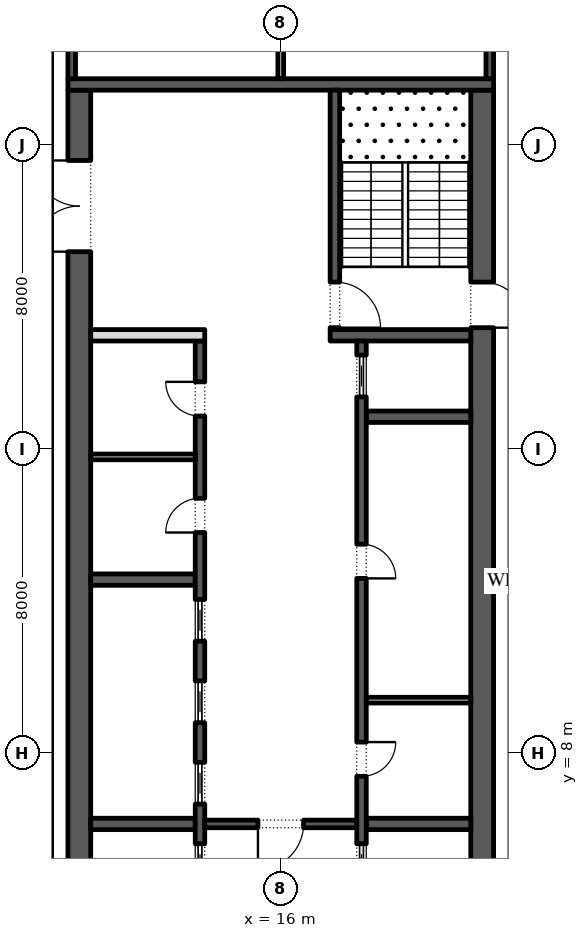
"""IFC4 building model, lengths in metres.
Left out: names, types, materials, properties, quantities, classifications, styles, units other than length and angle.
Written with IfcOpenShell. Run it as: python <this file> out.ifc"""

import sys

from ifc_helpers import new_model, si_unit, direction, frame, frame_2d, origin, place, context, subcontext, project, spatial, rectangle, extrude, element, fill, save


model = new_model("IFC4")
c1 = context("Model", 3, precision=1e-05, world=origin(), true_north=direction((0.0, 1.0)))
c2 = subcontext(c1, "Body", "Model", "MODEL_VIEW")
j1 = project(units=[si_unit("LENGTHUNIT", "METRE"), si_unit("PLANEANGLEUNIT", "RADIAN")], contexts=[c1])
p1 = place(None, origin())
s1 = spatial("IfcSite", under=j1, at=p1, CompositionType="ELEMENT")
p2 = place(p1, origin())
s2 = spatial("IfcBuilding", under=s1, at=p2, CompositionType="ELEMENT")
p3 = place(p2, frame((0.0, 0.0, 255.6)))
s3 = spatial("IfcBuildingStorey", under=s2, at=p3, CompositionType="ELEMENT", Elevation=255.6)
p4 = place(p3, frame((21.359, -11.678, 0.0), z_axis=(0.0, 0.0, 1.0), x_axis=(0.224949198343, 0.974370493275, 0.0)))
e1 = element("IfcWall", 1, at=p4, inside=s3, PredefinedType="STANDARD", context=c2, shape_type="SweptSolid", body=[
    extrude(rectangle(XDim=49.5, YDim=0.3, at=frame_2d((24.75, 0.0))), origin(), (0.0, 0.0, 1.0), 4.0),
])
p5 = place(p4, frame((1.157, 0.0, 0.45)))
e2 = element("IfcOpeningElement", 2, at=p5, cuts=e1, PredefinedType="OPENING", context=c2, shape_type="SweptSolid", body=[
    extrude(rectangle(XDim=4.5, YDim=3.05, at=frame_2d((2.25, 1.525))), frame((0.0, 0.16, 0.0), z_axis=(0.0, -1.0, 0.0), x_axis=(1.0, 0.0, 0.0)), (0.0, 0.0, 1.0), 0.32),
])
p6 = place(p4, frame((8.121, 0.0, 0.45)))
e3 = element("IfcOpeningElement", 3, at=p6, cuts=e1, PredefinedType="OPENING", context=c2, shape_type="SweptSolid", body=[
    extrude(rectangle(XDim=4.5, YDim=3.05, at=frame_2d((2.25, 1.525))), frame((0.0, 0.16, 0.0), z_axis=(0.0, -1.0, 0.0), x_axis=(1.0, 0.0, 0.0)), (0.0, 0.0, 1.0), 0.32),
])
p7 = place(p4, frame((15.236, 0.0, 0.45)))
e4 = element("IfcOpeningElement", 4, at=p7, cuts=e1, PredefinedType="OPENING", context=c2, shape_type="SweptSolid", body=[
    extrude(rectangle(XDim=4.5, YDim=3.05, at=frame_2d((2.25, 1.525))), frame((0.0, 0.16, 0.0), z_axis=(0.0, -1.0, 0.0), x_axis=(1.0, 0.0, 0.0)), (0.0, 0.0, 1.0), 0.32),
])
p8 = place(p4, frame((22.35, 0.0, 0.45)))
e5 = element("IfcOpeningElement", 5, at=p8, cuts=e1, PredefinedType="OPENING", context=c2, shape_type="SweptSolid", body=[
    extrude(rectangle(XDim=4.5, YDim=3.05, at=frame_2d((2.25, 1.525))), frame((0.0, 0.16, 0.0), z_axis=(0.0, -1.0, 0.0), x_axis=(1.0, 0.0, 0.0)), (0.0, 0.0, 1.0), 0.32),
])
p9 = place(p4, frame((29.464, 0.0, 0.45)))
e6 = element("IfcOpeningElement", 6, at=p9, cuts=e1, PredefinedType="OPENING", context=c2, shape_type="SweptSolid", body=[
    extrude(rectangle(XDim=4.5, YDim=2.95, at=frame_2d((2.25, 1.475))), frame((0.0, 0.16, 0.0), z_axis=(0.0, -1.0, 0.0), x_axis=(1.0, 0.0, 0.0)), (0.0, 0.0, 1.0), 0.32),
])
p10 = place(p4, frame((37.628, 0.0, 0.0)))
e7 = element("IfcOpeningElement", 7, at=p10, cuts=e1, PredefinedType="OPENING", context=c2, shape_type="SweptSolid", body=[
    extrude(rectangle(XDim=2.4, YDim=3.325, at=frame_2d((1.2, 1.663))), frame((0.0, 0.16, 0.0), z_axis=(0.0, -1.0, 0.0), x_axis=(1.0, 0.0, 0.0)), (0.0, 0.0, 1.0), 0.32),
])
p11 = place(p4, frame((43.693, 0.0, 0.45)))
e8 = element("IfcOpeningElement", 8, at=p11, cuts=e1, PredefinedType="OPENING", context=c2, shape_type="SweptSolid", body=[
    extrude(rectangle(XDim=4.5, YDim=3.05, at=frame_2d((2.25, 1.525))), frame((0.0, 0.16, 0.0), z_axis=(0.0, -1.0, 0.0), x_axis=(1.0, 0.0, 0.0)), (0.0, 0.0, 1.0), 0.32),
])
p12 = place(p3, frame((21.3, -2.45, 0.0), z_axis=(0.0, 0.0, 1.0), x_axis=(0.0, 1.0, 0.0)))
e9 = element("IfcWall", 9, at=p12, inside=s3, PredefinedType="SHEAR", context=c2, shape_type="SweptSolid", body=[
    extrude(rectangle(XDim=27.9, YDim=0.6, at=frame_2d((13.95, 0.0))), origin(), (0.0, 0.0, 1.0), 4.0),
])
p13 = place(p12, frame((5.05, 0.0, 0.0)))
e10 = element("IfcOpeningElement", 10, at=p13, cuts=e9, PredefinedType="OPENING", context=c2, shape_type="SweptSolid", body=[
    extrude(rectangle(XDim=1.2, YDim=2.1, at=frame_2d((0.6, 1.05))), frame((0.0, 0.31, 0.0), z_axis=(0.0, -1.0, 0.0), x_axis=(1.0, 0.0, 0.0)), (0.0, 0.0, 1.0), 0.62),
])
p14 = place(p12, frame((21.65, 0.0, 0.0)))
e11 = element("IfcOpeningElement", 11, at=p14, cuts=e9, PredefinedType="OPENING", context=c2, shape_type="SweptSolid", body=[
    extrude(rectangle(XDim=1.2, YDim=2.1, at=frame_2d((0.6, 1.05))), frame((0.0, 0.31, 0.0), z_axis=(0.0, -1.0, 0.0), x_axis=(1.0, 0.0, 0.0)), (0.0, 0.0, 1.0), 0.62),
])
p15 = place(p3, frame((10.7, -2.45, 0.0), z_axis=(0.0, 0.0, 1.0), x_axis=(0.0, 1.0, 0.0)))
e12 = element("IfcWall", 12, at=p15, inside=s3, PredefinedType="SHEAR", context=c2, shape_type="SweptSolid", body=[
    extrude(rectangle(XDim=27.9, YDim=0.6, at=frame_2d((13.95, 0.0))), origin(), (0.0, 0.0, 1.0), 4.0),
])
p16 = place(p15, frame((23.65, 0.0, 0.0)))
e13 = element("IfcOpeningElement", 13, at=p16, cuts=e12, PredefinedType="OPENING", context=c2, shape_type="SweptSolid", body=[
    extrude(rectangle(XDim=2.4, YDim=2.1, at=frame_2d((1.2, 1.05))), frame((0.0, 0.31, 0.0), z_axis=(0.0, -1.0, 0.0), x_axis=(1.0, 0.0, 0.0)), (0.0, 0.0, 1.0), 0.62),
])
p17 = place(p15, frame((1.087, 0.0, 0.0)))
e14 = element("IfcOpeningElement", 14, at=p17, cuts=e12, PredefinedType="OPENING", context=c2, shape_type="SweptSolid", body=[
    extrude(rectangle(XDim=0.9, YDim=2.1, at=frame_2d((0.45, 1.05))), frame((0.0, 0.31, 0.0), z_axis=(0.0, -1.0, 0.0), x_axis=(1.0, 0.0, 0.0)), (0.0, 0.0, 1.0), 0.62),
])
p18 = place(p15, frame((4.262, 0.0, 0.0)))
e15 = element("IfcOpeningElement", 15, at=p18, cuts=e12, PredefinedType="OPENING", context=c2, shape_type="SweptSolid", body=[
    extrude(rectangle(XDim=1.0, YDim=2.1, at=frame_2d((0.5, 1.05))), frame((0.0, 0.31, 0.0), z_axis=(0.0, -1.0, 0.0), x_axis=(1.0, 0.0, 0.0)), (0.0, 0.0, 1.0), 0.62),
])
p19 = place(p3, frame((10.4, 25.6, 0.0), z_axis=(0.0, 0.0, 1.0), x_axis=(1.0, 0.0, 0.0)))
e16 = element("IfcWall", 16, at=p19, inside=s3, PredefinedType="SHEAR", context=c2, shape_type="SweptSolid", body=[
    extrude(rectangle(XDim=11.2, YDim=0.3, at=frame_2d((5.6, 0.0))), origin(), (0.0, 0.0, 1.0), 4.0),
])
p20 = place(p3, frame((17.3, 19.0, 0.0), z_axis=(0.0, 0.0, 1.0), x_axis=(1.0, 0.0, 0.0)))
e17 = element("IfcWall", 17, at=p20, inside=s3, PredefinedType="SHEAR", context=c2, shape_type="SweptSolid", body=[
    extrude(rectangle(XDim=3.7, YDim=0.3, at=frame_2d((1.85, 0.0))), origin(), (0.0, 0.0, 1.0), 4.0),
])
p21 = place(p3, frame((17.425, 19.15, 0.0), z_axis=(0.0, 0.0, 1.0), x_axis=(0.0, 1.0, 0.0)))
e18 = element("IfcWall", 18, at=p21, inside=s3, PredefinedType="SHEAR", context=c2, shape_type="SweptSolid", body=[
    extrude(rectangle(XDim=6.3, YDim=0.25, at=frame_2d((3.15, 0.0))), origin(), (0.0, 0.0, 1.0), 4.0),
])
p22 = place(p21, frame((0.05, 0.0, 0.0)))
e19 = element("IfcOpeningElement", 19, at=p22, cuts=e18, PredefinedType="OPENING", context=c2, shape_type="SweptSolid", body=[
    extrude(rectangle(XDim=1.2, YDim=2.1, at=frame_2d((0.6, 1.05))), frame((0.0, 0.135, 0.0), z_axis=(0.0, -1.0, 0.0), x_axis=(1.0, 0.0, 0.0)), (0.0, 0.0, 1.0), 0.27),
])
for number, where, z_axis, x_axis in (
    (20, (18.25, 6.143, 0.0), (0.0, 0.0, 1.0), (1.0, 0.0, 0.0)),
    (21, (18.25, 16.857, 0.0), (0.0, 0.0, 1.0), (1.0, 0.0, 0.0)),
):
    element("IfcWall", number, at=place(p3, frame(where, z_axis=z_axis, x_axis=x_axis)), inside=s3, PredefinedType="SHEAR", context=c2, shape_type="SweptSolid", body=[
        extrude(rectangle(XDim=2.75, YDim=0.3, at=frame_2d((1.375, 0.0))), origin(), (0.0, 0.0, 1.0), 4.0),
    ])
p23 = place(p3, frame((18.125, 4.15, 0.0), z_axis=(0.0, 0.0, 1.0), x_axis=(0.0, 1.0, 0.0)))
e22 = element("IfcWall", 22, at=p23, inside=s3, PredefinedType="SHEAR", context=c2, shape_type="SweptSolid", body=[
    extrude(rectangle(XDim=14.7, YDim=0.25, at=frame_2d((7.35, 0.0))), origin(), (0.0, 0.0, 1.0), 4.0),
])
p24 = place(p23, frame((3.246, 0.0, 0.0)))
e23 = element("IfcOpeningElement", 23, at=p24, cuts=e22, PredefinedType="OPENING", context=c2, shape_type="SweptSolid", body=[
    extrude(rectangle(XDim=0.9, YDim=2.1, at=frame_2d((0.45, 1.05))), frame((0.0, 0.135, 0.0), z_axis=(0.0, -1.0, 0.0), x_axis=(1.0, 0.0, 0.0)), (0.0, 0.0, 1.0), 0.27),
])
p25 = place(p23, frame((8.454, 0.0, 0.0)))
e24 = element("IfcOpeningElement", 24, at=p25, cuts=e22, PredefinedType="OPENING", context=c2, shape_type="SweptSolid", body=[
    extrude(rectangle(XDim=0.9, YDim=2.1, at=frame_2d((0.45, 1.05))), frame((0.0, 0.135, 0.0), z_axis=(0.0, -1.0, 0.0), x_axis=(1.0, 0.0, 0.0)), (0.0, 0.0, 1.0), 0.27),
])
p26 = place(p23, frame((0.371, 0.0, 0.0)))
e25 = element("IfcOpeningElement", 25, at=p26, cuts=e22, PredefinedType="OPENING", context=c2, shape_type="SweptSolid", body=[
    extrude(rectangle(XDim=1.1, YDim=2.1, at=frame_2d((0.55, 1.05))), frame((0.0, 0.135, 0.0), z_axis=(0.0, -1.0, 0.0), x_axis=(1.0, 0.0, 0.0)), (0.0, 0.0, 1.0), 0.27),
])
p27 = place(p23, frame((13.229, 0.0, 0.0)))
e26 = element("IfcOpeningElement", 26, at=p27, cuts=e22, PredefinedType="OPENING", context=c2, shape_type="SweptSolid", body=[
    extrude(rectangle(XDim=1.1, YDim=2.1, at=frame_2d((0.55, 1.05))), frame((0.0, 0.135, 0.0), z_axis=(0.0, -1.0, 0.0), x_axis=(1.0, 0.0, 0.0)), (0.0, 0.0, 1.0), 0.27),
])
p28 = place(p3, frame((18.25, 9.4, 0.0), z_axis=(0.0, 0.0, 1.0), x_axis=(1.0, 0.0, 0.0)))
e27 = element("IfcWall", 27, at=p28, inside=s3, PredefinedType="PARTITIONING", context=c2, shape_type="SweptSolid", body=[
    extrude(rectangle(XDim=2.75, YDim=0.15, at=frame_2d((1.375, 0.0))), origin(), (0.0, 0.0, 1.0), 4.0),
])
for number, where, z_axis, x_axis in (
    (28, (11.0, 6.143, 0.0), (0.0, 0.0, 1.0), (1.0, 0.0, 0.0)),
    (29, (11.0, 12.571, 0.0), (0.0, 0.0, 1.0), (1.0, 0.0, 0.0)),
):
    element("IfcWall", number, at=place(p3, frame(where, z_axis=z_axis, x_axis=x_axis)), inside=s3, PredefinedType="SHEAR", context=c2, shape_type="SweptSolid", body=[
        extrude(rectangle(XDim=2.75, YDim=0.3, at=frame_2d((1.375, 0.0))), origin(), (0.0, 0.0, 1.0), 4.0),
    ])
p29 = place(p3, frame((13.875, -2.45, 0.0), z_axis=(0.0, 0.0, 1.0), x_axis=(0.0, 1.0, 0.0)))
e30 = element("IfcWall", 30, at=p29, inside=s3, PredefinedType="SHEAR", context=c2, shape_type="SweptSolid", body=[
    extrude(rectangle(XDim=21.3, YDim=0.25, at=frame_2d((10.65, 0.0))), origin(), (0.0, 0.0, 1.0), 4.0),
])
p30 = place(p29, frame((16.261, 0.0, 0.0)))
e31 = element("IfcOpeningElement", 31, at=p30, cuts=e30, PredefinedType="OPENING", context=c2, shape_type="SweptSolid", body=[
    extrude(rectangle(XDim=0.9, YDim=2.1, at=frame_2d((0.45, 1.05))), frame((0.0, 0.135, 0.0), z_axis=(0.0, -1.0, 0.0), x_axis=(1.0, 0.0, 0.0)), (0.0, 0.0, 1.0), 0.27),
])
p31 = place(p29, frame((19.325, 0.0, 0.0)))
e32 = element("IfcOpeningElement", 32, at=p31, cuts=e30, PredefinedType="OPENING", context=c2, shape_type="SweptSolid", body=[
    extrude(rectangle(XDim=0.9, YDim=2.1, at=frame_2d((0.45, 1.05))), frame((0.0, 0.135, 0.0), z_axis=(0.0, -1.0, 0.0), x_axis=(1.0, 0.0, 0.0)), (0.0, 0.0, 1.0), 0.27),
])
p32 = place(p29, frame((6.971, 0.0, 0.0)))
e33 = element("IfcOpeningElement", 33, at=p32, cuts=e30, PredefinedType="OPENING", context=c2, shape_type="SweptSolid", body=[
    extrude(rectangle(XDim=1.1, YDim=2.1, at=frame_2d((0.55, 1.05))), frame((0.0, 0.135, 0.0), z_axis=(0.0, -1.0, 0.0), x_axis=(1.0, 0.0, 0.0)), (0.0, 0.0, 1.0), 0.27),
])
p33 = place(p29, frame((9.114, 0.0, 0.0)))
e34 = element("IfcOpeningElement", 34, at=p33, cuts=e30, PredefinedType="OPENING", context=c2, shape_type="SweptSolid", body=[
    extrude(rectangle(XDim=1.1, YDim=2.1, at=frame_2d((0.55, 1.05))), frame((0.0, 0.135, 0.0), z_axis=(0.0, -1.0, 0.0), x_axis=(1.0, 0.0, 0.0)), (0.0, 0.0, 1.0), 0.27),
])
p34 = place(p29, frame((11.257, 0.0, 0.0)))
e35 = element("IfcOpeningElement", 35, at=p34, cuts=e30, PredefinedType="OPENING", context=c2, shape_type="SweptSolid", body=[
    extrude(rectangle(XDim=1.1, YDim=2.1, at=frame_2d((0.55, 1.05))), frame((0.0, 0.135, 0.0), z_axis=(0.0, -1.0, 0.0), x_axis=(1.0, 0.0, 0.0)), (0.0, 0.0, 1.0), 0.27),
])
p35 = place(p29, frame((13.4, 0.0, 0.0)))
e36 = element("IfcOpeningElement", 36, at=p35, cuts=e30, PredefinedType="OPENING", context=c2, shape_type="SweptSolid", body=[
    extrude(rectangle(XDim=1.1, YDim=2.1, at=frame_2d((0.55, 1.05))), frame((0.0, 0.135, 0.0), z_axis=(0.0, -1.0, 0.0), x_axis=(1.0, 0.0, 0.0)), (0.0, 0.0, 1.0), 0.27),
])
p36 = place(p3, frame((11.0, 19.0, 0.0), z_axis=(0.0, 0.0, 1.0), x_axis=(1.0, 0.0, 0.0)))
e37 = element("IfcWall", 37, at=p36, inside=s3, PredefinedType="PARTITIONING", context=c2, shape_type="SweptSolid", body=[
    extrude(rectangle(XDim=3.0, YDim=0.3, at=frame_2d((1.5, 0.0))), origin(), (0.0, 0.0, 1.0), 4.0),
])
p37 = place(p3, frame((11.0, 15.8, 0.0), z_axis=(0.0, 0.0, 1.0), x_axis=(1.0, 0.0, 0.0)))
e38 = element("IfcWall", 38, at=p37, inside=s3, PredefinedType="PARTITIONING", context=c2, shape_type="SweptSolid", body=[
    extrude(rectangle(XDim=2.75, YDim=0.15, at=frame_2d((1.375, 0.0))), origin(), (0.0, 0.0, 1.0), 4.0),
])
p38 = place(p3, frame((14.0, 6.143, 0.0), z_axis=(0.0, 0.0, 1.0), x_axis=(1.0, 0.0, 0.0)))
e39 = element("IfcWall", 39, at=p38, inside=s3, PredefinedType="SHEAR", context=c2, shape_type="SweptSolid", body=[
    extrude(rectangle(XDim=4.0, YDim=0.2, at=frame_2d((2.0, 0.0))), origin(), (0.0, 0.0, 1.0), 4.0),
])
p39 = place(p38, frame((1.4, 0.0, 0.0)))
e40 = element("IfcOpeningElement", 40, at=p39, cuts=e39, PredefinedType="OPENING", context=c2, shape_type="SweptSolid", body=[
    extrude(rectangle(XDim=1.2, YDim=2.1, at=frame_2d((0.6, 1.05))), frame((0.0, 0.11, 0.0), z_axis=(0.0, -1.0, 0.0), x_axis=(1.0, 0.0, 0.0)), (0.0, 0.0, 1.0), 0.22),
])
p40 = place(p3, frame((21.5, 25.75, 0.0), z_axis=(0.0, 0.0, 1.0), x_axis=(0.0, 1.0, 0.0)))
e41 = element("IfcWall", 41, at=p40, inside=s3, PredefinedType="SHEAR", context=c2, shape_type="SweptSolid", body=[
    extrude(rectangle(XDim=4.75, YDim=0.2, at=frame_2d((2.375, 0.0))), origin(), (0.0, 0.0, 1.0), 4.0),
])
p41 = place(p40, frame((1.925, 0.0, 0.0)))
e42 = element("IfcOpeningElement", 42, at=p41, cuts=e41, PredefinedType="OPENING", context=c2, shape_type="SweptSolid", body=[
    extrude(rectangle(XDim=0.9, YDim=2.1, at=frame_2d((0.45, 1.05))), frame((0.0, 0.11, 0.0), z_axis=(0.0, -1.0, 0.0), x_axis=(1.0, 0.0, 0.0)), (0.0, 0.0, 1.0), 0.22),
])
p42 = place(p3, frame((10.5, 25.75, 0.0), z_axis=(0.0, 0.0, 1.0), x_axis=(0.0, 1.0, 0.0)))
e43 = element("IfcWall", 43, at=p42, inside=s3, PredefinedType="SHEAR", context=c2, shape_type="SweptSolid", body=[
    extrude(rectangle(XDim=4.75, YDim=0.2, at=frame_2d((2.375, 0.0))), origin(), (0.0, 0.0, 1.0), 4.0),
])
p43 = place(p42, frame((1.925, 0.0, 0.0)))
e44 = element("IfcOpeningElement", 44, at=p43, cuts=e43, PredefinedType="OPENING", context=c2, shape_type="SweptSolid", body=[
    extrude(rectangle(XDim=0.9, YDim=2.1, at=frame_2d((0.45, 1.05))), frame((0.0, 0.11, 0.0), z_axis=(0.0, -1.0, 0.0), x_axis=(1.0, 0.0, 0.0)), (0.0, 0.0, 1.0), 0.22),
])
p44 = place(p3, frame((16.0, 25.75, 0.0), z_axis=(0.0, 0.0, 1.0), x_axis=(0.0, 1.0, 0.0)))
e45 = element("IfcWall", 45, at=p44, inside=s3, PredefinedType="PARTITIONING", context=c2, shape_type="SweptSolid", body=[
    extrude(rectangle(XDim=4.75, YDim=0.15, at=frame_2d((2.375, 0.0))), origin(), (0.0, 0.0, 1.0), 4.0),
])
p45 = place(p24, frame((0.9, -0.2, 0.0), z_axis=(0.0, 0.0, 1.0), x_axis=(-1.0, 0.0, 0.0)))
e46 = element("IfcDoor", 46, at=p45, inside=s3, OperationType="SINGLE_SWING_RIGHT", PredefinedType="DOOR", context=c2, shape_type="SweptSolid", body=[
    extrude(rectangle(XDim=0.9, YDim=2.1, at=frame_2d((0.45, 1.05))), frame((0.0, -0.075, 0.0), z_axis=(0.0, -1.0, 0.0), x_axis=(1.0, 0.0, 0.0)), (0.0, 0.0, 1.0), 0.05),
])
fill(e23, e46)
p46 = place(p25, frame((0.9, -0.2, 0.0), z_axis=(0.0, 0.0, 1.0), x_axis=(-1.0, 0.0, 0.0)))
e47 = element("IfcDoor", 47, at=p46, inside=s3, OperationType="SINGLE_SWING_LEFT", PredefinedType="DOOR", context=c2, shape_type="SweptSolid", body=[
    extrude(rectangle(XDim=0.9, YDim=2.1, at=frame_2d((0.45, 1.05))), frame((0.0, -0.075, 0.0), z_axis=(0.0, -1.0, 0.0), x_axis=(1.0, 0.0, 0.0)), (0.0, 0.0, 1.0), 0.05),
])
fill(e24, e47)
p47 = place(p26, origin())
e48 = element("IfcDoor", 48, at=p47, inside=s3, OperationType="SLIDING_TO_LEFT", PredefinedType="DOOR", context=c2, shape_type="SweptSolid", body=[
    extrude(rectangle(XDim=1.1, YDim=2.1, at=frame_2d((0.55, 1.05))), frame((0.0, 0.025, 0.0), z_axis=(0.0, -1.0, 0.0), x_axis=(1.0, 0.0, 0.0)), (0.0, 0.0, 1.0), 0.05),
])
fill(e25, e48)
p48 = place(p27, origin())
e49 = element("IfcDoor", 49, at=p48, inside=s3, OperationType="SLIDING_TO_LEFT", PredefinedType="DOOR", context=c2, shape_type="SweptSolid", body=[
    extrude(rectangle(XDim=1.1, YDim=2.1, at=frame_2d((0.55, 1.05))), frame((0.0, 0.025, 0.0), z_axis=(0.0, -1.0, 0.0), x_axis=(1.0, 0.0, 0.0)), (0.0, 0.0, 1.0), 0.05),
])
fill(e26, e49)
p49 = place(p30, origin())
e50 = element("IfcDoor", 50, at=p49, inside=s3, OperationType="SINGLE_SWING_RIGHT", PredefinedType="DOOR", context=c2, shape_type="SweptSolid", body=[
    extrude(rectangle(XDim=0.9, YDim=2.1, at=frame_2d((0.45, 1.05))), frame((0.0, 0.125, 0.0), z_axis=(0.0, -1.0, 0.0), x_axis=(1.0, 0.0, 0.0)), (0.0, 0.0, 1.0), 0.05),
])
fill(e31, e50)
p50 = place(p31, origin())
e51 = element("IfcDoor", 51, at=p50, inside=s3, OperationType="SINGLE_SWING_LEFT", PredefinedType="DOOR", context=c2, shape_type="SweptSolid", body=[
    extrude(rectangle(XDim=0.9, YDim=2.1, at=frame_2d((0.45, 1.05))), frame((0.0, 0.125, 0.0), z_axis=(0.0, -1.0, 0.0), x_axis=(1.0, 0.0, 0.0)), (0.0, 0.0, 1.0), 0.05),
])
fill(e32, e51)
p51 = place(p32, origin())
e52 = element("IfcDoor", 52, at=p51, inside=s3, OperationType="SLIDING_TO_LEFT", PredefinedType="DOOR", context=c2, shape_type="SweptSolid", body=[
    extrude(rectangle(XDim=1.1, YDim=2.1, at=frame_2d((0.55, 1.05))), frame((0.0, 0.025, 0.0), z_axis=(0.0, -1.0, 0.0), x_axis=(1.0, 0.0, 0.0)), (0.0, 0.0, 1.0), 0.05),
])
fill(e33, e52)
p52 = place(p33, origin())
e53 = element("IfcDoor", 53, at=p52, inside=s3, OperationType="SLIDING_TO_LEFT", PredefinedType="DOOR", context=c2, shape_type="SweptSolid", body=[
    extrude(rectangle(XDim=1.1, YDim=2.1, at=frame_2d((0.55, 1.05))), frame((0.0, 0.025, 0.0), z_axis=(0.0, -1.0, 0.0), x_axis=(1.0, 0.0, 0.0)), (0.0, 0.0, 1.0), 0.05),
])
fill(e34, e53)
p53 = place(p34, origin())
e54 = element("IfcDoor", 54, at=p53, inside=s3, OperationType="SLIDING_TO_LEFT", PredefinedType="DOOR", context=c2, shape_type="SweptSolid", body=[
    extrude(rectangle(XDim=1.1, YDim=2.1, at=frame_2d((0.55, 1.05))), frame((0.0, 0.025, 0.0), z_axis=(0.0, -1.0, 0.0), x_axis=(1.0, 0.0, 0.0)), (0.0, 0.0, 1.0), 0.05),
])
fill(e35, e54)
p54 = place(p35, origin())
e55 = element("IfcDoor", 55, at=p54, inside=s3, OperationType="SLIDING_TO_LEFT", PredefinedType="DOOR", context=c2, shape_type="SweptSolid", body=[
    extrude(rectangle(XDim=1.1, YDim=2.1, at=frame_2d((0.55, 1.05))), frame((0.0, 0.025, 0.0), z_axis=(0.0, -1.0, 0.0), x_axis=(1.0, 0.0, 0.0)), (0.0, 0.0, 1.0), 0.05),
])
fill(e36, e55)
p55 = place(p39, frame((1.2, 0.0, 0.0), z_axis=(0.0, 0.0, 1.0), x_axis=(-1.0, 0.0, 0.0)))
e56 = element("IfcDoor", 56, at=p55, inside=s3, OperationType="SINGLE_SWING_LEFT", PredefinedType="DOOR", context=c2, shape_type="SweptSolid", body=[
    extrude(rectangle(XDim=1.2, YDim=2.1, at=frame_2d((0.6, 1.05))), frame((0.0, 0.025, 0.0), z_axis=(0.0, -1.0, 0.0), x_axis=(1.0, 0.0, 0.0)), (0.0, 0.0, 1.0), 0.05),
])
fill(e40, e56)
p56 = place(p16, origin())
e57 = element("IfcDoor", 57, at=p56, inside=s3, OperationType="DOUBLE_DOOR_SINGLE_SWING", PredefinedType="DOOR", context=c2, shape_type="SweptSolid", body=[
    extrude(rectangle(XDim=2.4, YDim=2.1, at=frame_2d((1.2, 1.05))), frame((0.0, 0.025, 0.0), z_axis=(0.0, -1.0, 0.0), x_axis=(1.0, 0.0, 0.0)), (0.0, 0.0, 1.0), 0.05),
])
fill(e13, e57)
p57 = place(p22, frame((1.2, 0.0, 0.0), z_axis=(0.0, 0.0, 1.0), x_axis=(-1.0, 0.0, 0.0)))
e58 = element("IfcDoor", 58, at=p57, inside=s3, OperationType="SINGLE_SWING_LEFT", PredefinedType="DOOR", context=c2, shape_type="SweptSolid", body=[
    extrude(rectangle(XDim=1.2, YDim=2.1, at=frame_2d((0.6, 1.05))), frame((0.0, 0.025, 0.0), z_axis=(0.0, -1.0, 0.0), x_axis=(1.0, 0.0, 0.0)), (0.0, 0.0, 1.0), 0.05),
])
fill(e19, e58)
p58 = place(p14, frame((1.2, 0.0, 0.0), z_axis=(0.0, 0.0, 1.0), x_axis=(-1.0, 0.0, 0.0)))
e59 = element("IfcDoor", 59, at=p58, inside=s3, OperationType="SINGLE_SWING_LEFT", PredefinedType="DOOR", context=c2, shape_type="SweptSolid", body=[
    extrude(rectangle(XDim=1.2, YDim=2.1, at=frame_2d((0.6, 1.05))), frame((0.0, 0.025, 0.0), z_axis=(0.0, -1.0, 0.0), x_axis=(1.0, 0.0, 0.0)), (0.0, 0.0, 1.0), 0.05),
])
fill(e11, e59)
save(model, sys.argv[1])
